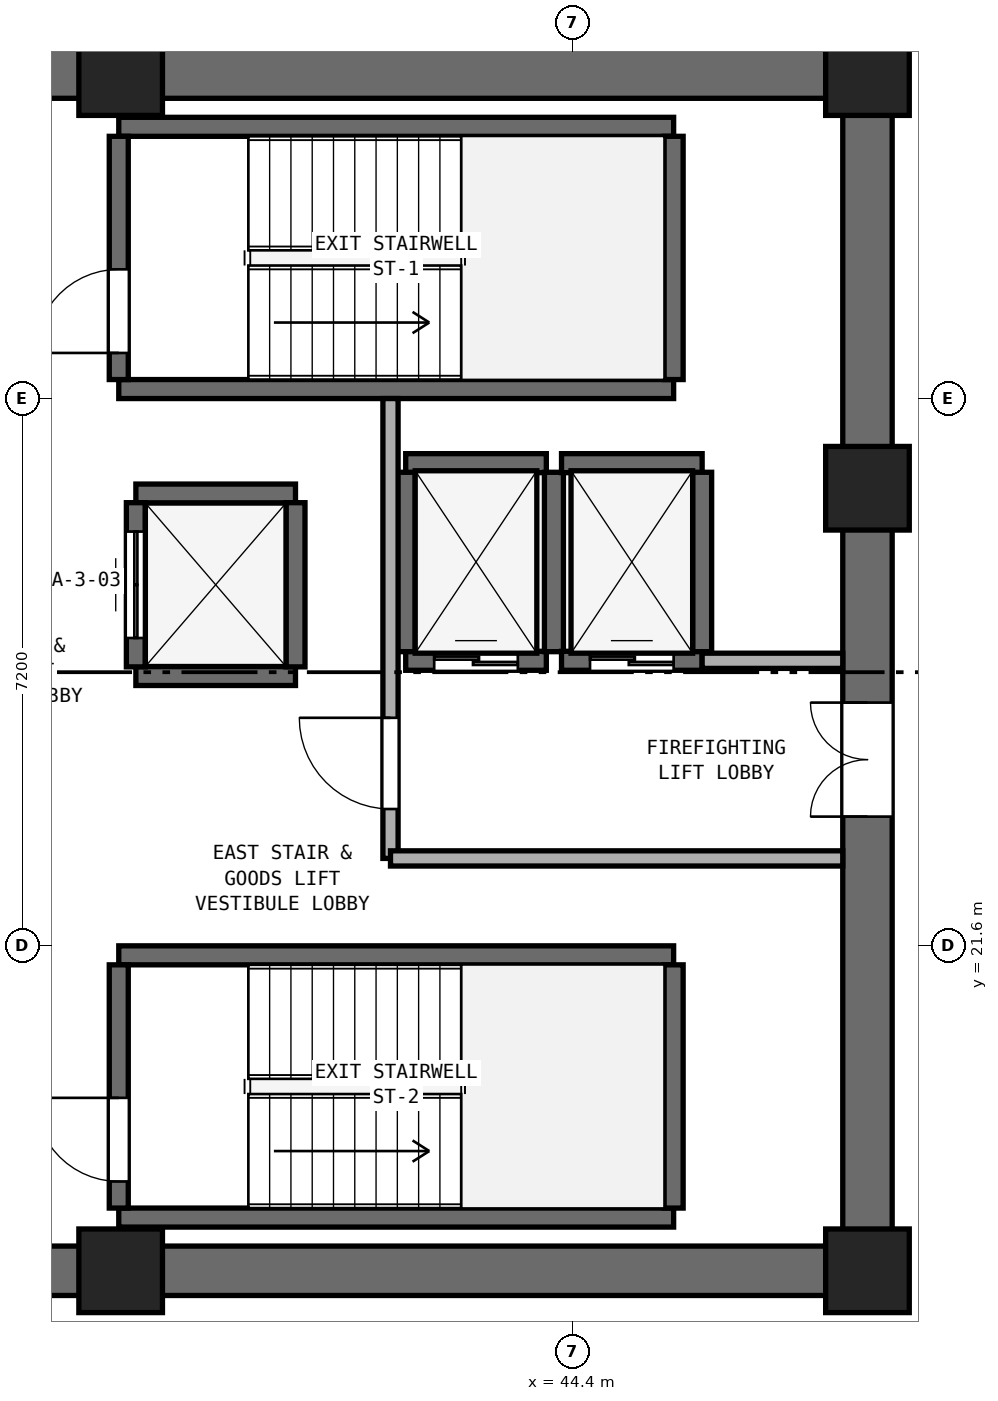
"""IFC4 building model, lengths in metres.
Left out: names, types, materials, properties, quantities, classifications, styles, units other than length and angle.
Written with IfcOpenShell. Run it as: python <this file> out.ifc"""

import sys

from ifc_helpers import new_model, si_unit, direction, frame, frame_2d, origin, origin_2d, place, context, subcontext, project, spatial, rectangle, extrude, element, fill, save


model = new_model("IFC4")
c1 = context("Model", 3, precision=1e-05, world=origin(), true_north=direction((0.0, 1.0)))
c2 = subcontext(c1, "Body", "Model", "MODEL_VIEW")
j1 = project(units=[si_unit("LENGTHUNIT", "METRE"), si_unit("PLANEANGLEUNIT", "RADIAN")], contexts=[c1])
p1 = place(None, origin())
s1 = spatial("IfcSite", under=j1, at=p1, CompositionType="ELEMENT")
p2 = place(p1, origin())
s2 = spatial("IfcBuilding", under=s1, at=p2, CompositionType="ELEMENT")
p3 = place(p2, frame((0.0, 0.0, 32.6)))
s3 = spatial("IfcBuildingStorey", under=s2, at=p3, CompositionType="ELEMENT", Elevation=32.6)
for number, where, z_axis, x_axis in (
    (1, (25.4, 17.325, 0.0), (0.0, 0.0, 1.0), (1.0, 0.0, 0.0)),
    (2, (25.4, 33.075, 0.0), (0.0, 0.0, 1.0), (1.0, 0.0, 0.0)),
):
    element("IfcWall", number, at=place(p3, frame(where, z_axis=z_axis, x_axis=x_axis)), inside=s3, PredefinedType="SHEAR", context=c2, shape_type="SweptSolid", body=[
        extrude(rectangle(XDim=23.2, YDim=0.65, at=frame_2d((11.6, 0.0))), origin(), (0.0, 0.0, 1.0), 3.525),
    ])
p4 = place(p3, frame((48.275, 17.65, 0.0), z_axis=(0.0, 0.0, 1.0), x_axis=(0.0, 1.0, 0.0)))
e3 = element("IfcWall", 3, at=p4, inside=s3, PredefinedType="SHEAR", context=c2, shape_type="SweptSolid", body=[
    extrude(rectangle(XDim=15.1, YDim=0.65, at=frame_2d((7.55, 0.0))), origin(), (0.0, 0.0, 1.0), 3.525),
])
p5 = place(p4, frame((5.65, 0.0, 0.0)))
e4 = element("IfcOpeningElement", 4, at=p5, cuts=e3, PredefinedType="OPENING", context=c2, shape_type="SweptSolid", body=[
    extrude(rectangle(XDim=1.5, YDim=2.15, at=frame_2d((0.75, 1.075))), frame((0.0, 0.335, 0.0), z_axis=(0.0, -1.0, 0.0), x_axis=(1.0, 0.0, 0.0)), (0.0, 0.0, 1.0), 0.67),
])
for number, where, z_axis, x_axis in (
    (5, (38.45, 17.325, 0.0), (0.0, 0.0, 1.0), (1.0, 0.0, 0.0)),
    (6, (48.275, 17.325, 0.0), (0.0, 0.0, 1.0), (1.0, 0.0, 0.0)),
    (7, (48.275, 27.62, 0.0), (0.0, 0.0, 1.0), (1.0, 0.0, 0.0)),
    (8, (48.275, 33.075, 0.0), (0.0, 0.0, 1.0), (1.0, 0.0, 0.0)),
    (9, (38.45, 33.075, 0.0), (0.0, 0.0, 1.0), (1.0, 0.0, 0.0)),
):
    element("IfcColumn", number, at=place(p3, frame(where, z_axis=z_axis, x_axis=x_axis)), inside=s3, PredefinedType="PILASTER", context=c2, shape_type="SweptSolid", body=[
        extrude(rectangle(XDim=1.1, YDim=1.1, at=origin_2d()), origin(), (0.0, 0.0, 1.0), 3.8),
    ])
for number, where, z_axis, x_axis in (
    (10, (38.425, 28.925, 0.0), (0.0, 0.0, 1.0), (1.0, 0.0, 0.0)),
    (11, (38.425, 32.375, 0.0), (0.0, 0.0, 1.0), (1.0, 0.0, 0.0)),
):
    element("IfcWall", number, at=place(p3, frame(where, z_axis=z_axis, x_axis=x_axis)), inside=s3, PredefinedType="SHEAR", context=c2, shape_type="SweptSolid", body=[
        extrude(rectangle(XDim=7.3, YDim=0.25, at=frame_2d((3.65, 0.0))), origin(), (0.0, 0.0, 1.0), 3.525),
    ])
p6 = place(p3, frame((38.425, 29.05, 0.0), z_axis=(0.0, 0.0, 1.0), x_axis=(0.0, 1.0, 0.0)))
e12 = element("IfcWall", 12, at=p6, inside=s3, PredefinedType="SHEAR", context=c2, shape_type="SweptSolid", body=[
    extrude(rectangle(XDim=3.2, YDim=0.25, at=frame_2d((1.6, 0.0))), origin(), (0.0, 0.0, 1.0), 3.525),
])
p7 = place(p6, frame((0.35, 0.0, 0.0)))
e13 = element("IfcOpeningElement", 13, at=p7, cuts=e12, PredefinedType="OPENING", context=c2, shape_type="SweptSolid", body=[
    extrude(rectangle(XDim=1.1, YDim=2.15, at=frame_2d((0.55, 1.075))), frame((0.0, 0.135, 0.0), z_axis=(0.0, -1.0, 0.0), x_axis=(1.0, 0.0, 0.0)), (0.0, 0.0, 1.0), 0.27),
])
p8 = place(p3, frame((45.725, 29.05, 0.0), z_axis=(0.0, 0.0, 1.0), x_axis=(0.0, 1.0, 0.0)))
e14 = element("IfcWall", 14, at=p8, inside=s3, PredefinedType="SHEAR", context=c2, shape_type="SweptSolid", body=[
    extrude(rectangle(XDim=3.2, YDim=0.25, at=frame_2d((1.6, 0.0))), origin(), (0.0, 0.0, 1.0), 3.525),
])
for number, where, z_axis, x_axis in (
    (15, (38.425, 18.025, 0.0), (0.0, 0.0, 1.0), (1.0, 0.0, 0.0)),
    (16, (38.425, 21.475, 0.0), (0.0, 0.0, 1.0), (1.0, 0.0, 0.0)),
):
    element("IfcWall", number, at=place(p3, frame(where, z_axis=z_axis, x_axis=x_axis)), inside=s3, PredefinedType="SHEAR", context=c2, shape_type="SweptSolid", body=[
        extrude(rectangle(XDim=7.3, YDim=0.25, at=frame_2d((3.65, 0.0))), origin(), (0.0, 0.0, 1.0), 3.525),
    ])
p9 = place(p3, frame((38.425, 18.15, 0.0), z_axis=(0.0, 0.0, 1.0), x_axis=(0.0, 1.0, 0.0)))
e17 = element("IfcWall", 17, at=p9, inside=s3, PredefinedType="SHEAR", context=c2, shape_type="SweptSolid", body=[
    extrude(rectangle(XDim=3.2, YDim=0.25, at=frame_2d((1.6, 0.0))), origin(), (0.0, 0.0, 1.0), 3.525),
])
p10 = place(p9, frame((0.35, 0.0, 0.0)))
e18 = element("IfcOpeningElement", 18, at=p10, cuts=e17, PredefinedType="OPENING", context=c2, shape_type="SweptSolid", body=[
    extrude(rectangle(XDim=1.1, YDim=2.15, at=frame_2d((0.55, 1.075))), frame((0.0, 0.135, 0.0), z_axis=(0.0, -1.0, 0.0), x_axis=(1.0, 0.0, 0.0)), (0.0, 0.0, 1.0), 0.27),
])
p11 = place(p3, frame((45.725, 18.15, 0.0), z_axis=(0.0, 0.0, 1.0), x_axis=(0.0, 1.0, 0.0)))
e19 = element("IfcWall", 19, at=p11, inside=s3, PredefinedType="SHEAR", context=c2, shape_type="SweptSolid", body=[
    extrude(rectangle(XDim=3.2, YDim=0.25, at=frame_2d((1.6, 0.0))), origin(), (0.0, 0.0, 1.0), 3.525),
])
p12 = place(p3, frame((42.2, 25.35, 0.0), z_axis=(0.0, 0.0, 1.0), x_axis=(1.0, 0.0, 0.0)))
e20 = element("IfcWall", 20, at=p12, inside=s3, PredefinedType="SHEAR", context=c2, shape_type="SweptSolid", body=[
    extrude(rectangle(XDim=1.85, YDim=0.25, at=frame_2d((0.925, 0.0))), origin(), (0.0, 0.0, 1.0), 3.525),
])
p13 = place(p12, frame((0.375, 0.0, 0.0)))
e21 = element("IfcOpeningElement", 21, at=p13, cuts=e20, PredefinedType="OPENING", context=c2, shape_type="SweptSolid", body=[
    extrude(rectangle(XDim=1.1, YDim=2.15, at=frame_2d((0.55, 1.075))), frame((0.0, 0.135, 0.0), z_axis=(0.0, -1.0, 0.0), x_axis=(1.0, 0.0, 0.0)), (0.0, 0.0, 1.0), 0.27),
])
p14 = place(p3, frame((42.2, 27.95, 0.0), z_axis=(0.0, 0.0, 1.0), x_axis=(1.0, 0.0, 0.0)))
e22 = element("IfcWall", 22, at=p14, inside=s3, PredefinedType="SHEAR", context=c2, shape_type="SweptSolid", body=[
    extrude(rectangle(XDim=1.85, YDim=0.25, at=frame_2d((0.925, 0.0))), origin(), (0.0, 0.0, 1.0), 3.525),
])
for number, where, z_axis, x_axis in (
    (23, (42.2, 25.47, 0.0), (0.0, 0.0, 1.0), (0.0, 1.0, 0.0)),
    (24, (44.15, 25.47, 0.0), (0.0, 0.0, 1.0), (0.0, 1.0, 0.0)),
):
    element("IfcWall", number, at=place(p3, frame(where, z_axis=z_axis, x_axis=x_axis)), inside=s3, PredefinedType="SHEAR", context=c2, shape_type="SweptSolid", body=[
        extrude(rectangle(XDim=2.36, YDim=0.25, at=frame_2d((1.18, 0.0))), origin(), (0.0, 0.0, 1.0), 3.525),
    ])
p15 = place(p3, frame((44.25, 25.35, 0.0), z_axis=(0.0, 0.0, 1.0), x_axis=(1.0, 0.0, 0.0)))
e25 = element("IfcWall", 25, at=p15, inside=s3, PredefinedType="SHEAR", context=c2, shape_type="SweptSolid", body=[
    extrude(rectangle(XDim=1.85, YDim=0.25, at=frame_2d((0.925, 0.0))), origin(), (0.0, 0.0, 1.0), 3.525),
])
p16 = place(p15, frame((0.375, 0.0, 0.0)))
e26 = element("IfcOpeningElement", 26, at=p16, cuts=e25, PredefinedType="OPENING", context=c2, shape_type="SweptSolid", body=[
    extrude(rectangle(XDim=1.1, YDim=2.15, at=frame_2d((0.55, 1.075))), frame((0.0, 0.135, 0.0), z_axis=(0.0, -1.0, 0.0), x_axis=(1.0, 0.0, 0.0)), (0.0, 0.0, 1.0), 0.27),
])
p17 = place(p3, frame((44.25, 27.95, 0.0), z_axis=(0.0, 0.0, 1.0), x_axis=(1.0, 0.0, 0.0)))
e27 = element("IfcWall", 27, at=p17, inside=s3, PredefinedType="SHEAR", context=c2, shape_type="SweptSolid", body=[
    extrude(rectangle(XDim=1.85, YDim=0.25, at=frame_2d((0.925, 0.0))), origin(), (0.0, 0.0, 1.0), 3.525),
])
p18 = place(p3, frame((46.1, 25.47, 0.0), z_axis=(0.0, 0.0, 1.0), x_axis=(0.0, 1.0, 0.0)))
e28 = element("IfcWall", 28, at=p18, inside=s3, PredefinedType="SHEAR", context=c2, shape_type="SweptSolid", body=[
    extrude(rectangle(XDim=2.36, YDim=0.25, at=frame_2d((1.18, 0.0))), origin(), (0.0, 0.0, 1.0), 3.525),
])
for number, where, z_axis, x_axis in (
    (29, (38.65, 25.15, 0.0), (0.0, 0.0, 1.0), (1.0, 0.0, 0.0)),
    (30, (38.65, 27.55, 0.0), (0.0, 0.0, 1.0), (1.0, 0.0, 0.0)),
):
    element("IfcWall", number, at=place(p3, frame(where, z_axis=z_axis, x_axis=x_axis)), inside=s3, PredefinedType="SHEAR", context=c2, shape_type="SweptSolid", body=[
        extrude(rectangle(XDim=2.1, YDim=0.25, at=frame_2d((1.05, 0.0))), origin(), (0.0, 0.0, 1.0), 3.525),
    ])
p19 = place(p3, frame((38.65, 25.27, 0.0), z_axis=(0.0, 0.0, 1.0), x_axis=(0.0, 1.0, 0.0)))
e31 = element("IfcWall", 31, at=p19, inside=s3, PredefinedType="SHEAR", context=c2, shape_type="SweptSolid", body=[
    extrude(rectangle(XDim=2.16, YDim=0.25, at=frame_2d((1.08, 0.0))), origin(), (0.0, 0.0, 1.0), 3.525),
])
p20 = place(p19, frame((0.38, 0.0, 0.0)))
e32 = element("IfcOpeningElement", 32, at=p20, cuts=e31, PredefinedType="OPENING", context=c2, shape_type="SweptSolid", body=[
    extrude(rectangle(XDim=1.4, YDim=2.2, at=frame_2d((0.7, 1.1))), frame((0.0, 0.135, 0.0), z_axis=(0.0, -1.0, 0.0), x_axis=(1.0, 0.0, 0.0)), (0.0, 0.0, 1.0), 0.27),
])
p21 = place(p3, frame((40.75, 25.27, 0.0), z_axis=(0.0, 0.0, 1.0), x_axis=(0.0, 1.0, 0.0)))
e33 = element("IfcWall", 33, at=p21, inside=s3, PredefinedType="SHEAR", context=c2, shape_type="SweptSolid", body=[
    extrude(rectangle(XDim=2.16, YDim=0.25, at=frame_2d((1.08, 0.0))), origin(), (0.0, 0.0, 1.0), 3.525),
])
p22 = place(p3, frame((42.0, 22.75, 0.0), z_axis=(0.0, 0.0, 1.0), x_axis=(0.0, 1.0, 0.0)))
e34 = element("IfcWall", 34, at=p22, inside=s3, PredefinedType="SOLIDWALL", context=c2, shape_type="SweptSolid", body=[
    extrude(rectangle(XDim=6.05, YDim=0.2, at=frame_2d((3.025, 0.0))), origin(), (0.0, 0.0, 1.0), 3.525),
])
p23 = place(p22, frame((0.65, 0.0, 0.0)))
e35 = element("IfcOpeningElement", 35, at=p23, cuts=e34, PredefinedType="OPENING", context=c2, shape_type="SweptSolid", body=[
    extrude(rectangle(XDim=1.2, YDim=2.15, at=frame_2d((0.6, 1.075))), frame((0.0, 0.11, 0.0), z_axis=(0.0, -1.0, 0.0), x_axis=(1.0, 0.0, 0.0)), (0.0, 0.0, 1.0), 0.22),
])
p24 = place(p3, frame((42.0, 22.75, 0.0), z_axis=(0.0, 0.0, 1.0), x_axis=(1.0, 0.0, 0.0)))
e36 = element("IfcWall", 36, at=p24, inside=s3, PredefinedType="SOLIDWALL", context=c2, shape_type="SweptSolid", body=[
    extrude(rectangle(XDim=5.95, YDim=0.2, at=frame_2d((2.975, 0.0))), origin(), (0.0, 0.0, 1.0), 3.525),
])
p25 = place(p3, frame((46.1, 25.35, 0.0), z_axis=(0.0, 0.0, 1.0), x_axis=(1.0, 0.0, 0.0)))
e37 = element("IfcWall", 37, at=p25, inside=s3, PredefinedType="SOLIDWALL", context=c2, shape_type="SweptSolid", body=[
    extrude(rectangle(XDim=1.85, YDim=0.2, at=frame_2d((0.925, 0.0))), origin(), (0.0, 0.0, 1.0), 3.525),
])
p26 = place(p7, origin())
e38 = element("IfcDoor", 38, at=p26, inside=s3, OperationType="SINGLE_SWING_LEFT", PredefinedType="DOOR", context=c2, shape_type="SweptSolid", body=[
    extrude(rectangle(XDim=1.1, YDim=2.15, at=frame_2d((0.55, 1.075))), frame((0.0, 0.025, 0.0), z_axis=(0.0, -1.0, 0.0), x_axis=(1.0, 0.0, 0.0)), (0.0, 0.0, 1.0), 0.05),
])
fill(e13, e38)
p27 = place(p10, origin())
e39 = element("IfcDoor", 39, at=p27, inside=s3, OperationType="SINGLE_SWING_RIGHT", PredefinedType="DOOR", context=c2, shape_type="SweptSolid", body=[
    extrude(rectangle(XDim=1.1, YDim=2.15, at=frame_2d((0.55, 1.075))), frame((0.0, 0.025, 0.0), z_axis=(0.0, -1.0, 0.0), x_axis=(1.0, 0.0, 0.0)), (0.0, 0.0, 1.0), 0.05),
])
fill(e18, e39)
p28 = place(p13, origin())
e40 = element("IfcDoor", 40, at=p28, inside=s3, OperationType="DOUBLE_DOOR_SLIDING", PredefinedType="DOOR", context=c2, shape_type="SweptSolid", body=[
    extrude(rectangle(XDim=1.1, YDim=2.15, at=frame_2d((0.55, 1.075))), frame((0.0, 0.025, 0.0), z_axis=(0.0, -1.0, 0.0), x_axis=(1.0, 0.0, 0.0)), (0.0, 0.0, 1.0), 0.05),
])
fill(e21, e40)
p29 = place(p16, origin())
e41 = element("IfcDoor", 41, at=p29, inside=s3, OperationType="DOUBLE_DOOR_SLIDING", PredefinedType="DOOR", context=c2, shape_type="SweptSolid", body=[
    extrude(rectangle(XDim=1.1, YDim=2.15, at=frame_2d((0.55, 1.075))), frame((0.0, 0.025, 0.0), z_axis=(0.0, -1.0, 0.0), x_axis=(1.0, 0.0, 0.0)), (0.0, 0.0, 1.0), 0.05),
])
fill(e26, e41)
p30 = place(p20, origin())
e42 = element("IfcDoor", 42, at=p30, inside=s3, OperationType="DOUBLE_DOOR_SLIDING", PredefinedType="DOOR", context=c2, shape_type="SweptSolid", body=[
    extrude(rectangle(XDim=1.4, YDim=2.2, at=frame_2d((0.7, 1.1))), frame((0.0, 0.025, 0.0), z_axis=(0.0, -1.0, 0.0), x_axis=(1.0, 0.0, 0.0)), (0.0, 0.0, 1.0), 0.05),
])
fill(e32, e42)
p31 = place(p23, origin())
e43 = element("IfcDoor", 43, at=p31, inside=s3, OperationType="SINGLE_SWING_RIGHT", PredefinedType="DOOR", context=c2, shape_type="SweptSolid", body=[
    extrude(rectangle(XDim=1.2, YDim=2.15, at=frame_2d((0.6, 1.075))), frame((0.0, 0.025, 0.0), z_axis=(0.0, -1.0, 0.0), x_axis=(1.0, 0.0, 0.0)), (0.0, 0.0, 1.0), 0.05),
])
fill(e35, e43)
p32 = place(p5, origin())
e44 = element("IfcDoor", 44, at=p32, inside=s3, OperationType="DOUBLE_DOOR_SINGLE_SWING", PredefinedType="DOOR", context=c2, shape_type="SweptSolid", body=[
    extrude(rectangle(XDim=1.5, YDim=2.15, at=frame_2d((0.75, 1.075))), frame((0.0, 0.025, 0.0), z_axis=(0.0, -1.0, 0.0), x_axis=(1.0, 0.0, 0.0)), (0.0, 0.0, 1.0), 0.05),
])
fill(e4, e44)
save(model, sys.argv[1])
